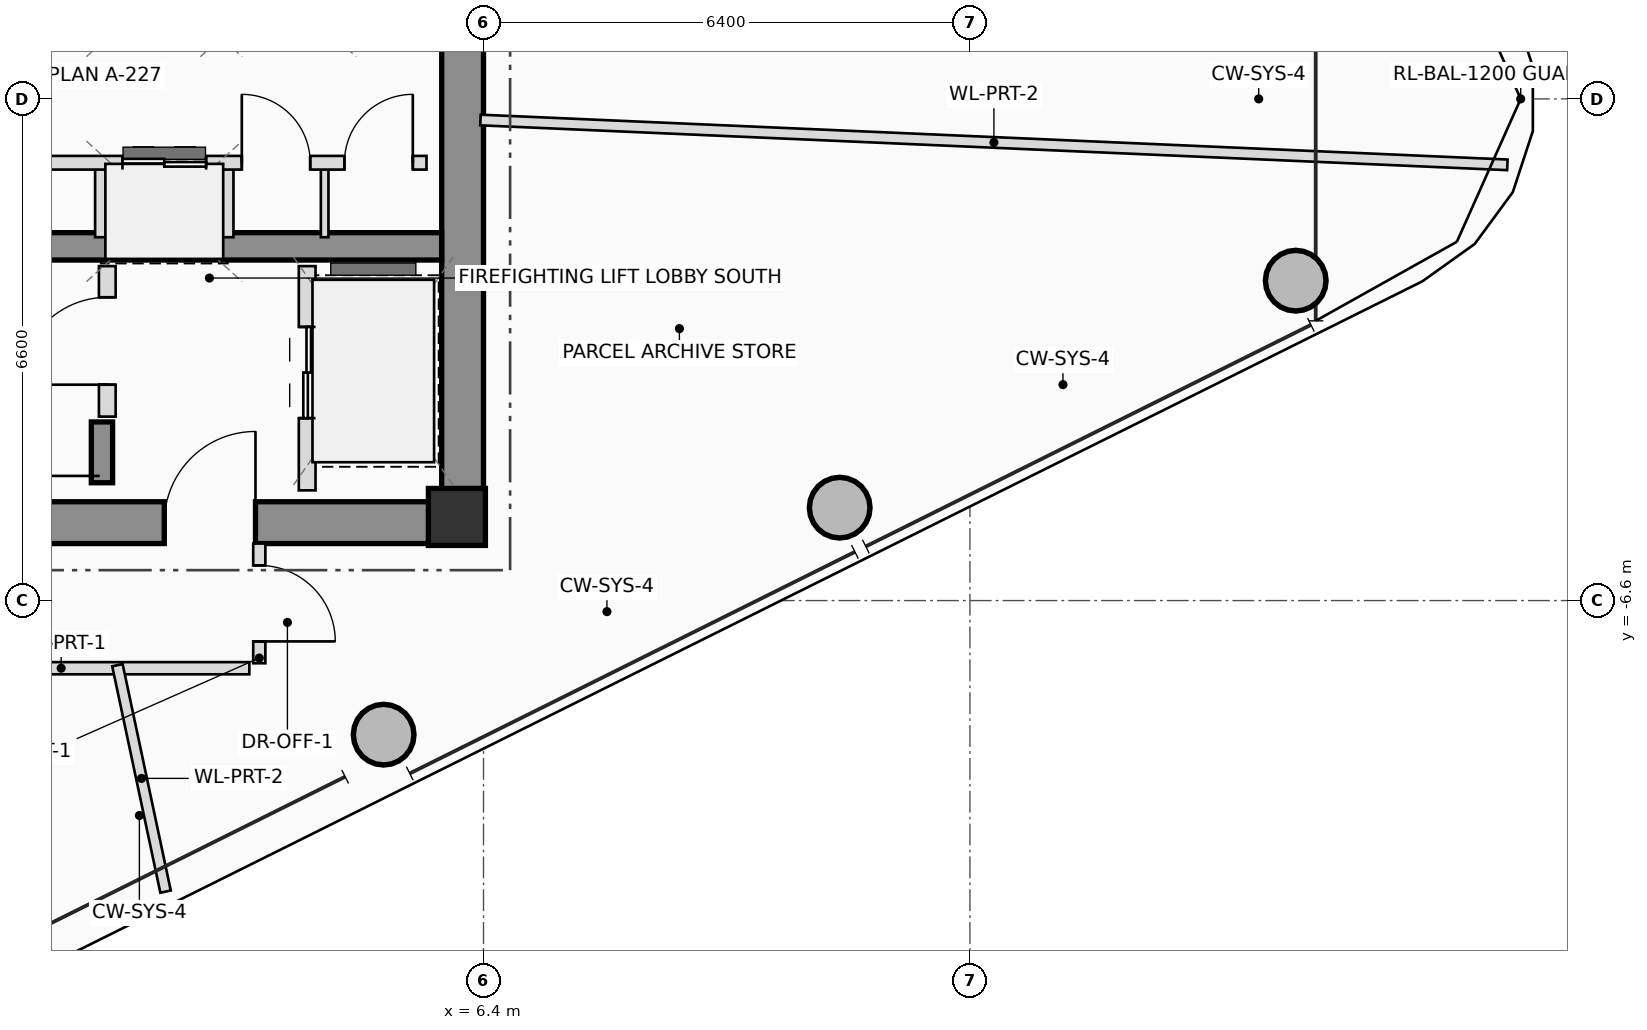
"""IFC4 building model, lengths in metres.
Left out: names, types, materials, properties, quantities, classifications, styles, units other than length and angle.
Written with IfcOpenShell. Run it as: python <this file> out.ifc"""

import sys

from ifc_helpers import new_model, si_unit, direction, frame, frame_2d, origin, origin_2d, place, context, subcontext, project, spatial, rectangle, hollow_circle, extrude, source, transform, mapped, element, fill, save


model = new_model("IFC4")
c1 = context("Model", 3, precision=1e-05, world=origin(), true_north=direction((0.0, 1.0)))
c2 = subcontext(c1, "Body", "Model", "MODEL_VIEW")
j1 = project(units=[si_unit("LENGTHUNIT", "METRE"), si_unit("PLANEANGLEUNIT", "RADIAN")], contexts=[c1])
p1 = place(None, origin())
s1 = spatial("IfcSite", under=j1, at=p1, CompositionType="ELEMENT")
p2 = place(p1, origin())
s2 = spatial("IfcBuilding", under=s1, at=p2, CompositionType="ELEMENT")
p3 = place(p2, frame((0.0, 0.0, 289.85)))
s3 = spatial("IfcBuildingStorey", under=s2, at=p3, CompositionType="ELEMENT", Elevation=289.85)
m1 = source(origin(), c2, "Body", "SweptSolid", [
    extrude(rectangle(XDim=0.75, YDim=0.75, at=origin_2d()), origin(), (0.0, 0.0, 1.0), 3.45),
])
p4 = place(p3, frame((6.05, -5.5, 0.0), z_axis=(0.0, 0.0, 1.0), x_axis=(1.0, 0.0, 0.0)))
e1 = element("IfcColumn", 1, at=p4, inside=s3, PredefinedType="COLUMN", context=c2, shape_type="MappedRepresentation", body=[
    mapped(m1, transform((0.0, 0.0, 0.0), scale=1.0)),
])
p5 = place(p3, frame((-6.4, -5.575, 0.0), z_axis=(0.0, 0.0, 1.0), x_axis=(1.0, 0.0, 0.0)))
e2 = element("IfcWall", 2, at=p5, inside=s3, PredefinedType="SHEAR", context=c2, shape_type="SweptSolid", body=[
    extrude(rectangle(XDim=12.8, YDim=0.55, at=frame_2d((6.4, 0.0))), origin(), (0.0, 0.0, 1.0), 3.45),
])
p6 = place(p5, frame((8.6, 0.0, 0.0)))
e3 = element("IfcOpeningElement", 3, at=p6, cuts=e2, PredefinedType="OPENING", context=c2, shape_type="SweptSolid", body=[
    extrude(rectangle(XDim=1.2, YDim=2.2, at=frame_2d((0.6, 1.1))), frame((0.0, 0.285, 0.0), z_axis=(0.0, -1.0, 0.0), x_axis=(1.0, 0.0, 0.0)), (0.0, 0.0, 1.0), 0.57),
])
p7 = place(p3, frame((6.125, -5.3, 0.0), z_axis=(0.0, 0.0, 1.0), x_axis=(0.0, 1.0, 0.0)))
e4 = element("IfcWall", 4, at=p7, inside=s3, PredefinedType="SHEAR", context=c2, shape_type="SweptSolid", body=[
    extrude(rectangle(XDim=10.6, YDim=0.55, at=frame_2d((5.3, 0.0))), origin(), (0.0, 0.0, 1.0), 3.45),
])
p8 = place(p3, frame((-5.85, -1.94, 0.0), z_axis=(0.0, 0.0, 1.0), x_axis=(1.0, 0.0, 0.0)))
e5 = element("IfcWall", 5, at=p8, inside=s3, PredefinedType="SHEAR", context=c2, shape_type="SweptSolid", body=[
    extrude(rectangle(XDim=11.7, YDim=0.36, at=frame_2d((5.85, 0.0))), origin(), (0.0, 0.0, 1.0), 3.45),
])
p9 = place(p3, frame((1.38, -5.05, 0.0), z_axis=(0.0, 0.0, 1.0), x_axis=(0.0, 1.0, 0.0)))
e6 = element("IfcWall", 6, at=p9, inside=s3, PredefinedType="SHEAR", context=c2, shape_type="SweptSolid", body=[
    extrude(rectangle(XDim=0.8, YDim=0.28, at=frame_2d((0.4, 0.0))), origin(), (0.0, 0.0, 1.0), 3.45),
])
m2 = source(origin(), c2, "Body", "SweptSolid", [
    extrude(hollow_circle(Radius=0.4, WallThickness=0.028, at=origin_2d()), origin(), (0.0, 0.0, 1.0), 3.45),
])
for number, where, z_axis, x_axis in (
    (7, (5.086, -8.364, 0.0), (0.0, 0.0, 1.0), (1.0, 0.0, 0.0)),
    (8, (11.086, -5.378, 0.0), (0.0, 0.0, 1.0), (1.0, 0.0, 0.0)),
    (9, (17.087, -2.392, 0.0), (0.0, 0.0, 1.0), (1.0, 0.0, 0.0)),
):
    element("IfcColumn", number, at=place(p3, frame(where, z_axis=z_axis, x_axis=x_axis)), inside=s3, PredefinedType="COLUMN", context=c2, shape_type="MappedRepresentation", body=[
        mapped(m2, transform((0.0, 0.0, 0.0), scale=1.0)),
    ])
p10 = place(p3, frame((1.45, -4.18, 0.0), z_axis=(0.0, 0.0, 1.0), x_axis=(0.0, 1.0, 0.0)))
e10 = element("IfcWall", 10, at=p10, inside=s3, PredefinedType="PLUMBINGWALL", context=c2, shape_type="SweptSolid", body=[
    extrude(rectangle(XDim=1.98, YDim=0.22, at=frame_2d((0.99, 0.0))), origin(), (0.0, 0.0, 1.0), 3.25),
])
p11 = place(p10, frame((0.42, 0.0, 0.0)))
e11 = element("IfcOpeningElement", 11, at=p11, cuts=e10, PredefinedType="OPENING", context=c2, shape_type="SweptSolid", body=[
    extrude(rectangle(XDim=1.15, YDim=2.15, at=frame_2d((0.575, 1.075))), frame((0.0, 0.12, 0.0), z_axis=(0.0, -1.0, 0.0), x_axis=(1.0, 0.0, 0.0)), (0.0, 0.0, 1.0), 0.24),
])
p12 = place(p3, frame((4.08, -5.15, 0.0), z_axis=(0.0, 0.0, 1.0), x_axis=(0.0, 1.0, 0.0)))
e12 = element("IfcWall", 12, at=p12, inside=s3, PredefinedType="PLUMBINGWALL", context=c2, shape_type="SweptSolid", body=[
    extrude(rectangle(XDim=2.95, YDim=0.22, at=frame_2d((1.475, 0.0))), origin(), (0.0, 0.0, 1.0), 3.25),
])
p13 = place(p12, frame((0.95, 0.0, 0.0)))
e13 = element("IfcOpeningElement", 13, at=p13, cuts=e12, PredefinedType="OPENING", context=c2, shape_type="SweptSolid", body=[
    extrude(rectangle(XDim=1.2, YDim=2.25, at=frame_2d((0.6, 1.125))), frame((0.0, 0.12, 0.0), z_axis=(0.0, -1.0, 0.0), x_axis=(1.0, 0.0, 0.0)), (0.0, 0.0, 1.0), 0.24),
])
for number, where, z_axis, x_axis in (
    (14, (1.38, -1.82, 0.0), (0.0, 0.0, 1.0), (0.0, 1.0, 0.0)),
    (15, (3.02, -1.82, 0.0), (0.0, 0.0, 1.0), (0.0, 1.0, 0.0)),
):
    element("IfcWall", number, at=place(p3, frame(where, z_axis=z_axis, x_axis=x_axis)), inside=s3, PredefinedType="PLUMBINGWALL", context=c2, shape_type="SweptSolid", body=[
        extrude(rectangle(XDim=0.98, YDim=0.18, at=frame_2d((0.49, 0.0))), origin(), (0.0, 0.0, 1.0), 3.25),
    ])
p14 = place(p3, frame((4.31, -1.82, 0.0), z_axis=(0.0, 0.0, 1.0), x_axis=(0.0, 1.0, 0.0)))
e16 = element("IfcWall", 16, at=p14, inside=s3, PredefinedType="PARTITIONING", context=c2, shape_type="SweptSolid", body=[
    extrude(rectangle(XDim=0.98, YDim=0.1, at=frame_2d((0.49, 0.0))), origin(), (0.0, 0.0, 1.0), 3.25),
])
p15 = place(p3, frame((-5.68, -0.84, 0.0), z_axis=(0.0, 0.0, 1.0), x_axis=(1.0, 0.0, 0.0)))
e17 = element("IfcWall", 17, at=p15, inside=s3, PredefinedType="PLUMBINGWALL", context=c2, shape_type="SweptSolid", body=[
    extrude(rectangle(XDim=11.33, YDim=0.18, at=frame_2d((5.665, 0.0))), origin(), (0.0, 0.0, 1.0), 3.25),
])
p16 = place(p15, frame((1.88, 0.0, 0.0)))
e18 = element("IfcOpeningElement", 18, at=p16, cuts=e17, PredefinedType="OPENING", context=c2, shape_type="SweptSolid", body=[
    extrude(rectangle(XDim=0.9, YDim=2.05, at=frame_2d((0.45, 1.025))), frame((0.0, 0.1, 0.0), z_axis=(0.0, -1.0, 0.0), x_axis=(1.0, 0.0, 0.0)), (0.0, 0.0, 1.0), 0.2),
])
p17 = place(p15, frame((5.35, 0.0, 0.0)))
e19 = element("IfcOpeningElement", 19, at=p17, cuts=e17, PredefinedType="OPENING", context=c2, shape_type="SweptSolid", body=[
    extrude(rectangle(XDim=0.9, YDim=2.05, at=frame_2d((0.45, 1.025))), frame((0.0, 0.1, 0.0), z_axis=(0.0, -1.0, 0.0), x_axis=(1.0, 0.0, 0.0)), (0.0, 0.0, 1.0), 0.2),
])
p18 = place(p15, frame((7.33, 0.0, 0.0)))
e20 = element("IfcOpeningElement", 20, at=p18, cuts=e17, PredefinedType="OPENING", context=c2, shape_type="SweptSolid", body=[
    extrude(rectangle(XDim=1.1, YDim=2.2, at=frame_2d((0.55, 1.1))), frame((0.0, 0.1, 0.0), z_axis=(0.0, -1.0, 0.0), x_axis=(1.0, 0.0, 0.0)), (0.0, 0.0, 1.0), 0.2),
])
p19 = place(p15, frame((8.9, 0.0, 0.0)))
e21 = element("IfcOpeningElement", 21, at=p19, cuts=e17, PredefinedType="OPENING", context=c2, shape_type="SweptSolid", body=[
    extrude(rectangle(XDim=0.9, YDim=2.05, at=frame_2d((0.45, 1.025))), frame((0.0, 0.1, 0.0), z_axis=(0.0, -1.0, 0.0), x_axis=(1.0, 0.0, 0.0)), (0.0, 0.0, 1.0), 0.2),
])
p20 = place(p15, frame((10.25, 0.0, 0.0)))
e22 = element("IfcOpeningElement", 22, at=p20, cuts=e17, PredefinedType="OPENING", context=c2, shape_type="SweptSolid", body=[
    extrude(rectangle(XDim=0.9, YDim=2.05, at=frame_2d((0.45, 1.025))), frame((0.0, 0.1, 0.0), z_axis=(0.0, -1.0, 0.0), x_axis=(1.0, 0.0, 0.0)), (0.0, 0.0, 1.0), 0.2),
])
p21 = place(p3, frame((3.45, -5.85, 0.0), z_axis=(0.0, 0.0, 1.0), x_axis=(0.0, -1.0, 0.0)))
e23 = element("IfcWall", 23, at=p21, inside=s3, PredefinedType="PARTITIONING", context=c2, shape_type="SweptSolid", body=[
    extrude(rectangle(XDim=1.575, YDim=0.16, at=frame_2d((0.787, 0.0))), origin(), (0.0, 0.0, 1.0), 2.855),
])
p22 = place(p21, frame((0.287, 0.0, 0.0)))
e24 = element("IfcOpeningElement", 24, at=p22, cuts=e23, PredefinedType="OPENING", context=c2, shape_type="SweptSolid", body=[
    extrude(rectangle(XDim=1.0, YDim=2.25, at=frame_2d((0.5, 1.125))), frame((0.0, 0.09, 0.0), z_axis=(0.0, -1.0, 0.0), x_axis=(1.0, 0.0, 0.0)), (0.0, 0.0, 1.0), 0.18),
])
p23 = place(p3, frame((3.319, -7.49, 0.0), z_axis=(0.0, 0.0, 1.0), x_axis=(-1.0, 0.0, 0.0)))
e25 = element("IfcWall", 25, at=p23, inside=s3, PredefinedType="PARTITIONING", context=c2, shape_type="SweptSolid", body=[
    extrude(rectangle(XDim=9.679, YDim=0.16, at=frame_2d((4.84, 0.0))), origin(), (0.0, 0.0, 1.0), 2.655),
])
p24 = place(p23, frame((5.101, 0.0, 0.0)))
e26 = element("IfcOpeningElement", 26, at=p24, cuts=e25, PredefinedType="OPENING", context=c2, shape_type="SweptSolid", body=[
    extrude(rectangle(XDim=1.0, YDim=2.25, at=frame_2d((0.5, 1.125))), frame((0.0, 0.09, 0.0), z_axis=(0.0, -1.0, 0.0), x_axis=(1.0, 0.0, 0.0)), (0.0, 0.0, 1.0), 0.18),
])
p25 = place(p3, frame((6.36, -0.278, 0.0), z_axis=(0.0, 0.0, 1.0), x_axis=(0.999047623791, -0.043633076864, 0.0)))
e27 = element("IfcWall", 27, at=p25, inside=s3, PredefinedType="PARTITIONING", context=c2, shape_type="SweptSolid", body=[
    extrude(rectangle(XDim=13.524, YDim=0.14, at=frame_2d((6.762, 0.0))), origin(), (0.0, 0.0, 1.0), 2.815),
])
p26 = place(p3, frame((1.583, -7.45, 0.0), z_axis=(0.0, 0.0, 1.0), x_axis=(0.207941206443, -0.978141326529, 0.0)))
e28 = element("IfcWall", 28, at=p26, inside=s3, PredefinedType="PARTITIONING", context=c2, shape_type="SweptSolid", body=[
    extrude(rectangle(XDim=3.046, YDim=0.14, at=frame_2d((1.523, 0.0))), origin(), (0.0, 0.0, 1.0), 2.815),
])
p27 = place(p6, origin())
e29 = element("IfcDoor", 29, at=p27, inside=s3, OperationType="SINGLE_SWING_RIGHT", PredefinedType="DOOR", context=c2, shape_type="SweptSolid", body=[
    extrude(rectangle(XDim=1.2, YDim=2.2, at=frame_2d((0.6, 1.1))), frame((0.0, 0.025, 0.0), z_axis=(0.0, -1.0, 0.0), x_axis=(1.0, 0.0, 0.0)), (0.0, 0.0, 1.0), 0.05),
])
fill(e3, e29)
p28 = place(p11, origin())
e30 = element("IfcDoor", 30, at=p28, inside=s3, OperationType="SINGLE_SWING_LEFT", PredefinedType="DOOR", context=c2, shape_type="SweptSolid", body=[
    extrude(rectangle(XDim=1.15, YDim=2.15, at=frame_2d((0.575, 1.075))), frame((0.0, 0.025, 0.0), z_axis=(0.0, -1.0, 0.0), x_axis=(1.0, 0.0, 0.0)), (0.0, 0.0, 1.0), 0.05),
])
fill(e11, e30)
p29 = place(p13, origin())
e31 = element("IfcDoor", 31, at=p29, inside=s3, OperationType="DOUBLE_DOOR_SLIDING", PredefinedType="DOOR", context=c2, shape_type="SweptSolid", body=[
    extrude(rectangle(XDim=1.2, YDim=2.25, at=frame_2d((0.6, 1.125))), frame((0.0, 0.025, 0.0), z_axis=(0.0, -1.0, 0.0), x_axis=(1.0, 0.0, 0.0)), (0.0, 0.0, 1.0), 0.05),
])
fill(e13, e31)
p30 = place(p18, origin())
e32 = element("IfcDoor", 32, at=p30, inside=s3, OperationType="DOUBLE_DOOR_SLIDING", PredefinedType="DOOR", context=c2, shape_type="SweptSolid", body=[
    extrude(rectangle(XDim=1.1, YDim=2.2, at=frame_2d((0.55, 1.1))), frame((0.0, 0.025, 0.0), z_axis=(0.0, -1.0, 0.0), x_axis=(1.0, 0.0, 0.0)), (0.0, 0.0, 1.0), 0.05),
])
fill(e20, e32)
p31 = place(p19, origin())
e33 = element("IfcDoor", 33, at=p31, inside=s3, OperationType="SINGLE_SWING_LEFT", PredefinedType="DOOR", context=c2, shape_type="SweptSolid", body=[
    extrude(rectangle(XDim=0.9, YDim=2.05, at=frame_2d((0.45, 1.025))), frame((0.0, 0.025, 0.0), z_axis=(0.0, -1.0, 0.0), x_axis=(1.0, 0.0, 0.0)), (0.0, 0.0, 1.0), 0.05),
])
fill(e21, e33)
p32 = place(p20, origin())
e34 = element("IfcDoor", 34, at=p32, inside=s3, OperationType="SINGLE_SWING_RIGHT", PredefinedType="DOOR", context=c2, shape_type="SweptSolid", body=[
    extrude(rectangle(XDim=0.9, YDim=2.05, at=frame_2d((0.45, 1.025))), frame((0.0, 0.025, 0.0), z_axis=(0.0, -1.0, 0.0), x_axis=(1.0, 0.0, 0.0)), (0.0, 0.0, 1.0), 0.05),
])
fill(e22, e34)
p33 = place(p22, origin())
e35 = element("IfcDoor", 35, at=p33, inside=s3, OperationType="SINGLE_SWING_RIGHT", PredefinedType="DOOR", context=c2, shape_type="SweptSolid", body=[
    extrude(rectangle(XDim=1.0, YDim=2.25, at=frame_2d((0.5, 1.125))), frame((0.0, 0.025, 0.0), z_axis=(0.0, -1.0, 0.0), x_axis=(1.0, 0.0, 0.0)), (0.0, 0.0, 1.0), 0.05),
])
fill(e24, e35)
save(model, sys.argv[1])
